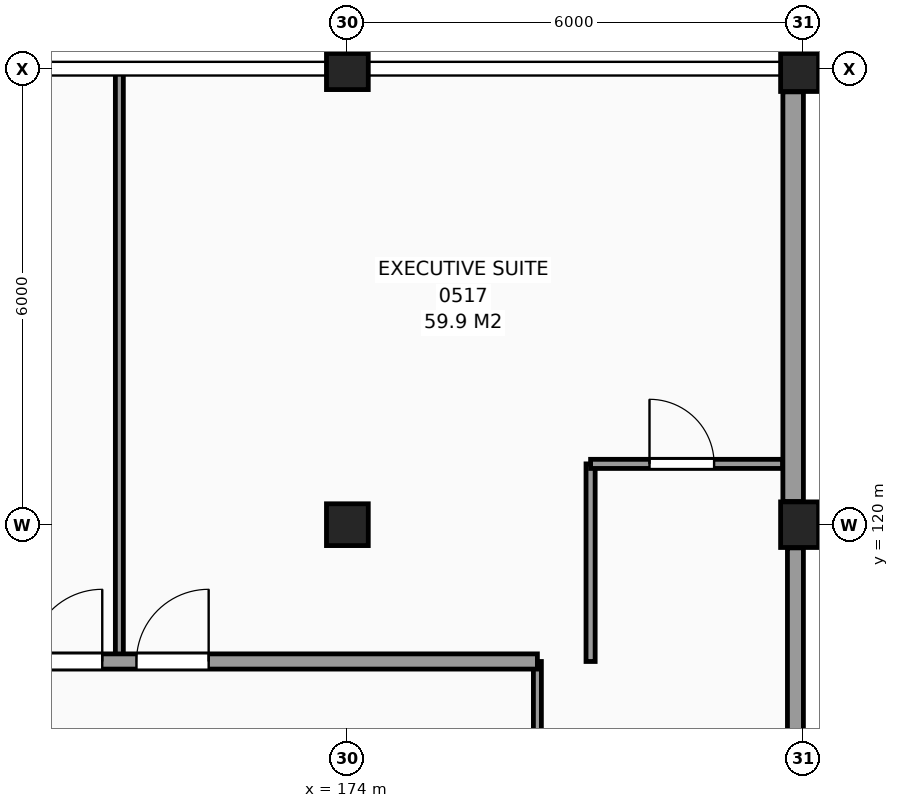
"""IFC4 building model, lengths in metres.
Left out: names, types, materials, properties, quantities, classifications, styles, units other than length and angle.
Written with IfcOpenShell. Run it as: python <this file> out.ifc"""

import sys

from ifc_helpers import new_model, si_unit, direction, frame, frame_2d, origin, origin_2d, place, context, subcontext, project, spatial, rectangle, extrude, element, fill, save


model = new_model("IFC4")
c1 = context("Model", 3, precision=1e-05, world=origin(), true_north=direction((0.0, 1.0)))
c2 = subcontext(c1, "Body", "Model", "MODEL_VIEW")
j1 = project(units=[si_unit("LENGTHUNIT", "METRE"), si_unit("PLANEANGLEUNIT", "RADIAN")], contexts=[c1])
p1 = place(None, origin())
s1 = spatial("IfcSite", under=j1, at=p1, CompositionType="ELEMENT")
p2 = place(p1, origin())
s2 = spatial("IfcBuilding", under=s1, at=p2, CompositionType="ELEMENT")
p3 = place(p2, frame((0.0, 0.0, 24.6)))
s3 = spatial("IfcBuildingStorey", under=s2, at=p3, CompositionType="ELEMENT", Elevation=24.6)
for number, where, z_axis, x_axis in (
    (1, (174.0, 120.0, 0.0), (0.0, 0.0, 1.0), (1.0, 0.0, 0.0)),
    (2, (174.0, 126.0, 0.0), (0.0, 0.0, 1.0), (1.0, 0.0, 0.0)),
):
    element("IfcColumn", number, at=place(p3, frame(where, z_axis=z_axis, x_axis=x_axis)), inside=s3, PredefinedType="COLUMN", context=c2, shape_type="SweptSolid", body=[
        extrude(rectangle(XDim=0.55, YDim=0.55, at=origin_2d()), origin(), (0.0, 0.0, 1.0), 3.6),
    ])
for number, where, z_axis, x_axis in (
    (3, (180.0, 120.0, 0.0), (0.0, 0.0, 1.0), (1.0, 0.0, 0.0)),
    (4, (180.0, 126.0, 0.0), (0.0, 0.0, 1.0), (1.0, 0.0, 0.0)),
):
    element("IfcColumn", number, at=place(p3, frame(where, z_axis=z_axis, x_axis=x_axis)), inside=s3, PredefinedType="COLUMN", context=c2, shape_type="SweptSolid", body=[
        extrude(rectangle(XDim=0.6, YDim=0.6, at=origin_2d()), origin(), (0.0, 0.0, 1.0), 3.6),
    ])
p4 = place(p3, frame((179.895, 114.305, 0.0), z_axis=(0.0, 0.0, 1.0), x_axis=(0.0, 1.0, 0.0)))
e5 = element("IfcWall", 5, at=p4, inside=s3, PredefinedType="SOLIDWALL", context=c2, shape_type="SweptSolid", body=[
    extrude(rectangle(XDim=5.39, YDim=0.21, at=frame_2d((2.695, 0.0))), origin(), (0.0, 0.0, 1.0), 2.73),
])
p5 = place(p3, frame((179.865, 120.305, 0.0), z_axis=(0.0, 0.0, 1.0), x_axis=(0.0, 1.0, 0.0)))
e6 = element("IfcWall", 6, at=p5, inside=s3, PredefinedType="SOLIDWALL", context=c2, shape_type="SweptSolid", body=[
    extrude(rectangle(XDim=5.39, YDim=0.27, at=frame_2d((2.695, 0.0))), origin(), (0.0, 0.0, 1.0), 2.73),
])
p6 = place(p3, frame((171.0, 118.2, 0.0), z_axis=(0.0, 0.0, 1.0), x_axis=(0.0, 1.0, 0.0)))
e7 = element("IfcWall", 7, at=p6, inside=s3, PredefinedType="PARTITIONING", context=c2, shape_type="SweptSolid", body=[
    extrude(rectangle(XDim=7.755, YDim=0.105, at=frame_2d((3.877, 0.0))), origin(), (0.0, 0.0, 1.0), 3.38),
])
p7 = place(p3, frame((176.5, 115.8, 0.0), z_axis=(0.0, 0.0, 1.0), x_axis=(0.0, 1.0, 0.0)))
e8 = element("IfcWall", 8, at=p7, inside=s3, PredefinedType="PARTITIONING", context=c2, shape_type="SweptSolid", body=[
    extrude(rectangle(XDim=2.4, YDim=0.105, at=frame_2d((1.2, 0.0))), origin(), (0.0, 0.0, 1.0), 3.38),
])
p8 = place(p3, frame((177.2, 118.2, 0.0), z_axis=(0.0, 0.0, 1.0), x_axis=(0.0, 1.0, 0.0)))
e9 = element("IfcWall", 9, at=p8, inside=s3, PredefinedType="PARTITIONING", context=c2, shape_type="SweptSolid", body=[
    extrude(rectangle(XDim=2.6, YDim=0.12, at=frame_2d((1.3, 0.0))), origin(), (0.0, 0.0, 1.0), 3.38),
])
p9 = place(p3, frame((66.255, 118.2, 0.0), z_axis=(0.0, 0.0, 1.0), x_axis=(1.0, 0.0, 0.0)))
e10 = element("IfcWall", 10, at=p9, inside=s3, PredefinedType="PARTITIONING", context=c2, shape_type="SweptSolid", body=[
    extrude(rectangle(XDim=110.245, YDim=0.2, at=frame_2d((55.123, 0.0))), origin(), (0.0, 0.0, 1.0), 3.38),
])
p10 = place(p9, frame((7.57, 0.0, 0.0)))
e11 = element("IfcOpeningElement", 11, at=p10, cuts=e10, PredefinedType="OPENING", context=c2, shape_type="SweptSolid", body=[
    extrude(rectangle(XDim=0.95, YDim=2.1, at=frame_2d((0.475, 1.05))), frame((0.0, 0.11, 0.0), z_axis=(0.0, -1.0, 0.0), x_axis=(1.0, 0.0, 0.0)), (0.0, 0.0, 1.0), 0.22),
])
p11 = place(p9, frame((12.07, 0.0, 0.0)))
e12 = element("IfcOpeningElement", 12, at=p11, cuts=e10, PredefinedType="OPENING", context=c2, shape_type="SweptSolid", body=[
    extrude(rectangle(XDim=0.95, YDim=2.1, at=frame_2d((0.475, 1.05))), frame((0.0, 0.11, 0.0), z_axis=(0.0, -1.0, 0.0), x_axis=(1.0, 0.0, 0.0)), (0.0, 0.0, 1.0), 0.22),
])
p12 = place(p9, frame((16.27, 0.0, 0.0)))
e13 = element("IfcOpeningElement", 13, at=p12, cuts=e10, PredefinedType="OPENING", context=c2, shape_type="SweptSolid", body=[
    extrude(rectangle(XDim=0.95, YDim=2.1, at=frame_2d((0.475, 1.05))), frame((0.0, 0.11, 0.0), z_axis=(0.0, -1.0, 0.0), x_axis=(1.0, 0.0, 0.0)), (0.0, 0.0, 1.0), 0.22),
])
p13 = place(p9, frame((18.47, 0.0, 0.0)))
e14 = element("IfcOpeningElement", 14, at=p13, cuts=e10, PredefinedType="OPENING", context=c2, shape_type="SweptSolid", body=[
    extrude(rectangle(XDim=0.95, YDim=2.1, at=frame_2d((0.475, 1.05))), frame((0.0, 0.11, 0.0), z_axis=(0.0, -1.0, 0.0), x_axis=(1.0, 0.0, 0.0)), (0.0, 0.0, 1.0), 0.22),
])
p14 = place(p9, frame((32.32, 0.0, 0.0)))
e15 = element("IfcOpeningElement", 15, at=p14, cuts=e10, PredefinedType="OPENING", context=c2, shape_type="SweptSolid", body=[
    extrude(rectangle(XDim=0.95, YDim=2.1, at=frame_2d((0.475, 1.05))), frame((0.0, 0.11, 0.0), z_axis=(0.0, -1.0, 0.0), x_axis=(1.0, 0.0, 0.0)), (0.0, 0.0, 1.0), 0.22),
])
p15 = place(p9, frame((36.47, 0.0, 0.0)))
e16 = element("IfcOpeningElement", 16, at=p15, cuts=e10, PredefinedType="OPENING", context=c2, shape_type="SweptSolid", body=[
    extrude(rectangle(XDim=0.95, YDim=2.1, at=frame_2d((0.475, 1.05))), frame((0.0, 0.11, 0.0), z_axis=(0.0, -1.0, 0.0), x_axis=(1.0, 0.0, 0.0)), (0.0, 0.0, 1.0), 0.22),
])
p16 = place(p9, frame((46.27, 0.0, 0.0)))
e17 = element("IfcOpeningElement", 17, at=p16, cuts=e10, PredefinedType="OPENING", context=c2, shape_type="SweptSolid", body=[
    extrude(rectangle(XDim=0.95, YDim=2.1, at=frame_2d((0.475, 1.05))), frame((0.0, 0.11, 0.0), z_axis=(0.0, -1.0, 0.0), x_axis=(1.0, 0.0, 0.0)), (0.0, 0.0, 1.0), 0.22),
])
p17 = place(p9, frame((48.47, 0.0, 0.0)))
e18 = element("IfcOpeningElement", 18, at=p17, cuts=e10, PredefinedType="OPENING", context=c2, shape_type="SweptSolid", body=[
    extrude(rectangle(XDim=0.95, YDim=2.1, at=frame_2d((0.475, 1.05))), frame((0.0, 0.11, 0.0), z_axis=(0.0, -1.0, 0.0), x_axis=(1.0, 0.0, 0.0)), (0.0, 0.0, 1.0), 0.22),
])
p18 = place(p9, frame((52.87, 0.0, 0.0)))
e19 = element("IfcOpeningElement", 19, at=p18, cuts=e10, PredefinedType="OPENING", context=c2, shape_type="SweptSolid", body=[
    extrude(rectangle(XDim=0.95, YDim=2.1, at=frame_2d((0.475, 1.05))), frame((0.0, 0.11, 0.0), z_axis=(0.0, -1.0, 0.0), x_axis=(1.0, 0.0, 0.0)), (0.0, 0.0, 1.0), 0.22),
])
p19 = place(p9, frame((60.07, 0.0, 0.0)))
e20 = element("IfcOpeningElement", 20, at=p19, cuts=e10, PredefinedType="OPENING", context=c2, shape_type="SweptSolid", body=[
    extrude(rectangle(XDim=0.95, YDim=2.1, at=frame_2d((0.475, 1.05))), frame((0.0, 0.11, 0.0), z_axis=(0.0, -1.0, 0.0), x_axis=(1.0, 0.0, 0.0)), (0.0, 0.0, 1.0), 0.22),
])
p20 = place(p9, frame((68.32, 0.0, 0.0)))
e21 = element("IfcOpeningElement", 21, at=p20, cuts=e10, PredefinedType="OPENING", context=c2, shape_type="SweptSolid", body=[
    extrude(rectangle(XDim=0.95, YDim=2.1, at=frame_2d((0.475, 1.05))), frame((0.0, 0.11, 0.0), z_axis=(0.0, -1.0, 0.0), x_axis=(1.0, 0.0, 0.0)), (0.0, 0.0, 1.0), 0.22),
])
p21 = place(p9, frame((80.32, 0.0, 0.0)))
e22 = element("IfcOpeningElement", 22, at=p21, cuts=e10, PredefinedType="OPENING", context=c2, shape_type="SweptSolid", body=[
    extrude(rectangle(XDim=0.95, YDim=2.1, at=frame_2d((0.475, 1.05))), frame((0.0, 0.11, 0.0), z_axis=(0.0, -1.0, 0.0), x_axis=(1.0, 0.0, 0.0)), (0.0, 0.0, 1.0), 0.22),
])
p22 = place(p9, frame((82.87, 0.0, 0.0)))
e23 = element("IfcOpeningElement", 23, at=p22, cuts=e10, PredefinedType="OPENING", context=c2, shape_type="SweptSolid", body=[
    extrude(rectangle(XDim=0.95, YDim=2.1, at=frame_2d((0.475, 1.05))), frame((0.0, 0.11, 0.0), z_axis=(0.0, -1.0, 0.0), x_axis=(1.0, 0.0, 0.0)), (0.0, 0.0, 1.0), 0.22),
])
p23 = place(p9, frame((90.07, 0.0, 0.0)))
e24 = element("IfcOpeningElement", 24, at=p23, cuts=e10, PredefinedType="OPENING", context=c2, shape_type="SweptSolid", body=[
    extrude(rectangle(XDim=0.95, YDim=2.1, at=frame_2d((0.475, 1.05))), frame((0.0, 0.11, 0.0), z_axis=(0.0, -1.0, 0.0), x_axis=(1.0, 0.0, 0.0)), (0.0, 0.0, 1.0), 0.22),
])
p24 = place(p9, frame((94.27, 0.0, 0.0)))
e25 = element("IfcOpeningElement", 25, at=p24, cuts=e10, PredefinedType="OPENING", context=c2, shape_type="SweptSolid", body=[
    extrude(rectangle(XDim=0.95, YDim=2.1, at=frame_2d((0.475, 1.05))), frame((0.0, 0.11, 0.0), z_axis=(0.0, -1.0, 0.0), x_axis=(1.0, 0.0, 0.0)), (0.0, 0.0, 1.0), 0.22),
])
p25 = place(p9, frame((103.57, 0.0, 0.0)))
e26 = element("IfcOpeningElement", 26, at=p25, cuts=e10, PredefinedType="OPENING", context=c2, shape_type="SweptSolid", body=[
    extrude(rectangle(XDim=0.95, YDim=2.1, at=frame_2d((0.475, 1.05))), frame((0.0, 0.11, 0.0), z_axis=(0.0, -1.0, 0.0), x_axis=(1.0, 0.0, 0.0)), (0.0, 0.0, 1.0), 0.22),
])
p26 = place(p9, frame((104.97, 0.0, 0.0)))
e27 = element("IfcOpeningElement", 27, at=p26, cuts=e10, PredefinedType="OPENING", context=c2, shape_type="SweptSolid", body=[
    extrude(rectangle(XDim=0.95, YDim=2.1, at=frame_2d((0.475, 1.05))), frame((0.0, 0.11, 0.0), z_axis=(0.0, -1.0, 0.0), x_axis=(1.0, 0.0, 0.0)), (0.0, 0.0, 1.0), 0.22),
])
p27 = place(p3, frame((177.2, 120.8, 0.0), z_axis=(0.0, 0.0, 1.0), x_axis=(1.0, 0.0, 0.0)))
e28 = element("IfcWall", 28, at=p27, inside=s3, PredefinedType="PARTITIONING", context=c2, shape_type="SweptSolid", body=[
    extrude(rectangle(XDim=2.525, YDim=0.12, at=frame_2d((1.263, 0.0))), origin(), (0.0, 0.0, 1.0), 3.38),
])
p28 = place(p27, frame((0.775, 0.0, 0.0)))
e29 = element("IfcOpeningElement", 29, at=p28, cuts=e28, PredefinedType="OPENING", context=c2, shape_type="SweptSolid", body=[
    extrude(rectangle(XDim=0.85, YDim=2.1, at=frame_2d((0.425, 1.05))), frame((0.0, 0.07, 0.0), z_axis=(0.0, -1.0, 0.0), x_axis=(1.0, 0.0, 0.0)), (0.0, 0.0, 1.0), 0.14),
])
p29 = place(p25, origin())
e30 = element("IfcDoor", 30, at=p29, inside=s3, OperationType="SINGLE_SWING_RIGHT", PredefinedType="DOOR", context=c2, shape_type="SweptSolid", body=[
    extrude(rectangle(XDim=0.95, YDim=2.1, at=frame_2d((0.475, 1.05))), frame((0.0, 0.025, 0.0), z_axis=(0.0, -1.0, 0.0), x_axis=(1.0, 0.0, 0.0)), (0.0, 0.0, 1.0), 0.05),
])
fill(e26, e30)
p30 = place(p28, origin())
e31 = element("IfcDoor", 31, at=p30, inside=s3, OperationType="SINGLE_SWING_LEFT", PredefinedType="DOOR", context=c2, shape_type="SweptSolid", body=[
    extrude(rectangle(XDim=0.85, YDim=2.1, at=frame_2d((0.425, 1.05))), frame((0.0, 0.025, 0.0), z_axis=(0.0, -1.0, 0.0), x_axis=(1.0, 0.0, 0.0)), (0.0, 0.0, 1.0), 0.05),
])
fill(e29, e31)
p31 = place(p26, origin())
e32 = element("IfcDoor", 32, at=p31, inside=s3, OperationType="SINGLE_SWING_RIGHT", PredefinedType="DOOR", context=c2, shape_type="SweptSolid", body=[
    extrude(rectangle(XDim=0.95, YDim=2.1, at=frame_2d((0.475, 1.05))), frame((0.0, 0.025, 0.0), z_axis=(0.0, -1.0, 0.0), x_axis=(1.0, 0.0, 0.0)), (0.0, 0.0, 1.0), 0.05),
])
fill(e27, e32)
save(model, sys.argv[1])
